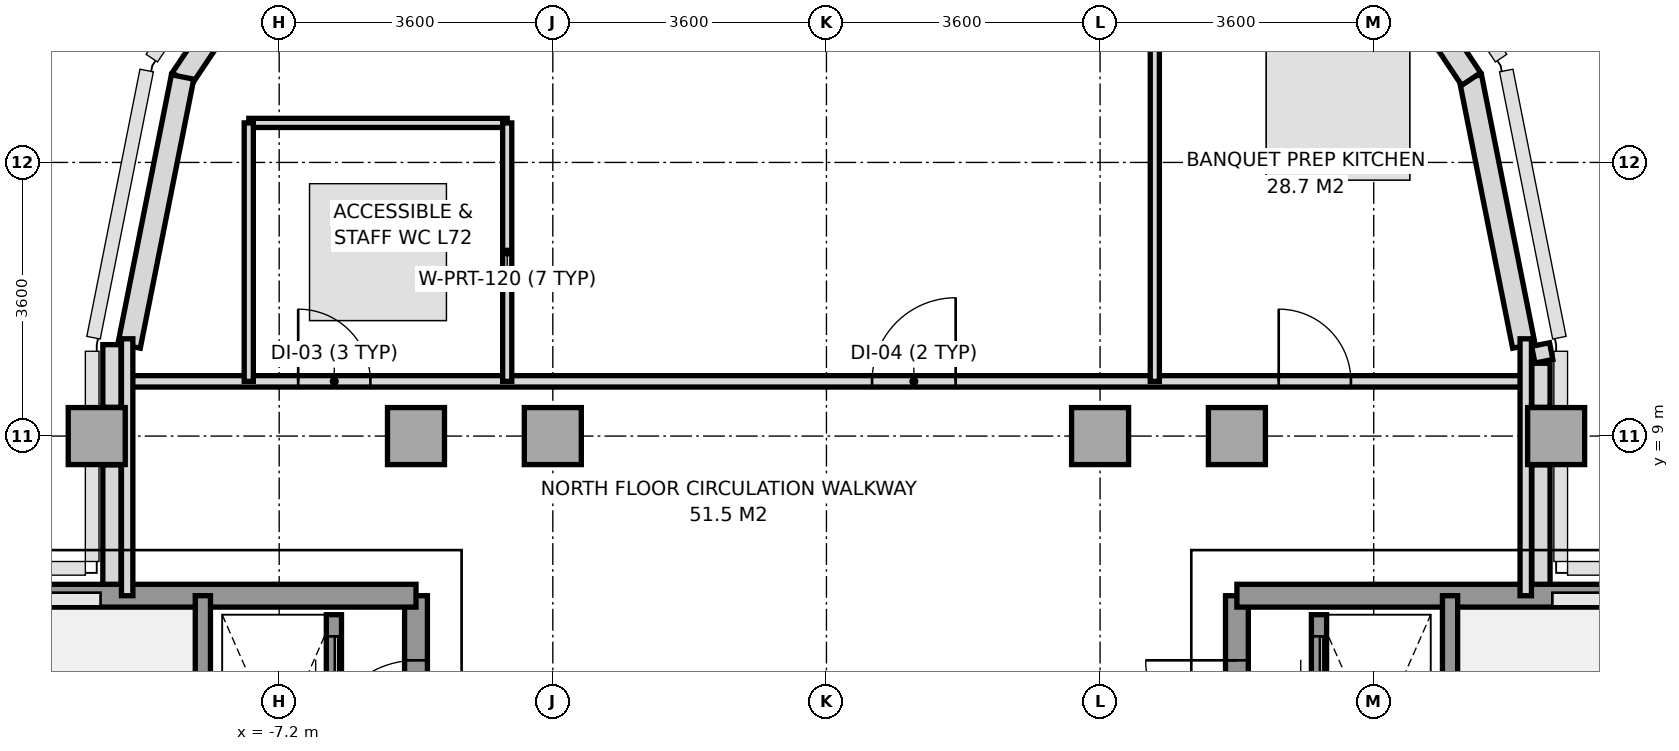
"""IFC4 building model, lengths in metres.
Left out: names, types, materials, properties, quantities, classifications, styles, units other than length and angle.
Written with IfcOpenShell. Run it as: python <this file> out.ifc"""

import sys

from ifc_helpers import new_model, si_unit, direction, frame, frame_2d, origin, origin_2d, place, context, subcontext, project, spatial, rectangle, extrude, source, transform, mapped, element, fill, save


model = new_model("IFC4")
c1 = context("Model", 3, precision=1e-05, world=origin(), true_north=direction((0.0, 1.0)))
c2 = subcontext(c1, "Body", "Model", "MODEL_VIEW")
j1 = project(units=[si_unit("LENGTHUNIT", "METRE"), si_unit("PLANEANGLEUNIT", "RADIAN")], contexts=[c1])
p1 = place(None, origin())
s1 = spatial("IfcSite", under=j1, at=p1, CompositionType="ELEMENT")
p2 = place(p1, origin())
s2 = spatial("IfcBuilding", under=s1, at=p2, CompositionType="ELEMENT")
p3 = place(p2, frame((0.0, 0.0, 258.8)))
s3 = spatial("IfcBuildingStorey", under=s2, at=p3, CompositionType="ELEMENT", Elevation=258.8)
m1 = source(origin(), c2, "Body", "SweptSolid", [
    extrude(rectangle(XDim=0.75, YDim=0.75, at=origin_2d()), origin(), (0.0, 0.0, 1.0), 3.01),
])
for number, where, z_axis, x_axis in (
    (1, (-9.6, 9.0, 0.0), (0.0, 0.0, 1.0), (1.0, 0.0, 0.0)),
    (2, (-5.4, 9.0, 0.0), (0.0, 0.0, 1.0), (1.0, 0.0, 0.0)),
    (3, (-3.6, 9.0, 0.0), (0.0, 0.0, 1.0), (1.0, 0.0, 0.0)),
    (4, (3.6, 9.0, 0.0), (0.0, 0.0, 1.0), (1.0, 0.0, 0.0)),
    (5, (5.4, 9.0, 0.0), (0.0, 0.0, 1.0), (1.0, 0.0, 0.0)),
    (6, (9.6, 9.0, 0.0), (0.0, 0.0, 1.0), (1.0, 0.0, 0.0)),
):
    element("IfcColumn", number, at=place(p3, frame(where, z_axis=z_axis, x_axis=x_axis)), inside=s3, PredefinedType="COLUMN", context=c2, shape_type="MappedRepresentation", body=[
        mapped(m1, transform((0.0, 0.0, 0.0), x_axis=(1.0, 0.0, 0.0), y_axis=(0.0, 1.0, 0.0), z_axis=(0.0, 0.0, 1.0), scale=1.0)),
    ])
p4 = place(p3, frame((9.175, 10.185, 0.0), z_axis=(0.0, 0.0, 1.0), x_axis=(-0.195114232679, 0.980780523974, 0.0)))
e7 = element("IfcWall", 7, at=p4, inside=s3, PredefinedType="SOLIDWALL", context=c2, shape_type="SweptSolid", body=[
    extrude(rectangle(XDim=3.609, YDim=0.3, at=frame_2d((1.804, 0.0))), origin(), (0.0, 0.0, 1.0), 3.01),
])
for number, where, z_axis, x_axis in (
    (8, (8.482, 13.698, 0.0), (0.0, 0.0, 1.0), (-0.556, 0.831, 0.0)),
    (9, (-7.305, 15.458, 0.0), (0.0, 0.0, 1.0), (-0.556, -0.831, 0.0)),
):
    element("IfcWall", number, at=place(p3, frame(where, z_axis=z_axis, x_axis=x_axis)), inside=s3, PredefinedType="SOLIDWALL", context=c2, shape_type="SweptSolid", body=[
        extrude(rectangle(XDim=2.118, YDim=0.3, at=frame_2d((1.059, 0.0))), origin(), (0.0, 0.0, 1.0), 2.61),
    ])
p5 = place(p3, frame((-8.471, 13.725, 0.0), z_axis=(0.0, 0.0, 1.0), x_axis=(-0.195114232679, -0.980780523974, 0.0)))
e10 = element("IfcWall", 10, at=p5, inside=s3, PredefinedType="SOLIDWALL", context=c2, shape_type="SweptSolid", body=[
    extrude(rectangle(XDim=3.609, YDim=0.3, at=frame_2d((1.804, 0.0))), origin(), (0.0, 0.0, 1.0), 3.01),
])
p6 = place(p3, frame((-9.4, 6.953, 0.0), z_axis=(0.0, 0.0, 1.0), x_axis=(0.0, 1.0, 0.0)))
e11 = element("IfcWall", 11, at=p6, inside=s3, PredefinedType="PARAPET", context=c2, shape_type="SweptSolid", body=[
    extrude(rectangle(XDim=1.669, YDim=0.24, at=frame_2d((0.834, 0.0))), origin(), (0.0, 0.0, 1.0), 1.15),
])
p7 = place(p3, frame((-9.4, 9.378, 0.0), z_axis=(0.0, 0.0, 1.0), x_axis=(0.0, 1.0, 0.0)))
e12 = element("IfcWall", 12, at=p7, inside=s3, PredefinedType="PARAPET", context=c2, shape_type="SweptSolid", body=[
    extrude(rectangle(XDim=0.825, YDim=0.24, at=frame_2d((0.413, 0.0))), origin(), (0.0, 0.0, 1.0), 1.15),
])
p8 = place(p3, frame((9.395, 10.204, 0.0), z_axis=(0.0, 0.0, 1.0), x_axis=(0.194859894132, -0.980831087221, 0.0)))
e13 = element("IfcWall", 13, at=p8, inside=s3, PredefinedType="PARAPET", context=c2, shape_type="SweptSolid", body=[
    extrude(rectangle(XDim=0.224, YDim=0.24, at=frame_2d((0.112, 0.0))), origin(), (0.0, 0.0, 1.0), 1.15),
])
p9 = place(p3, frame((9.4, 9.958, 0.0), z_axis=(0.0, 0.0, 1.0), x_axis=(0.0, -1.0, 0.0)))
e14 = element("IfcWall", 14, at=p9, inside=s3, PredefinedType="PARAPET", context=c2, shape_type="SweptSolid", body=[
    extrude(rectangle(XDim=0.58, YDim=0.24, at=frame_2d((0.29, 0.0))), origin(), (0.0, 0.0, 1.0), 1.15),
])
p10 = place(p3, frame((9.4, 8.622, 0.0), z_axis=(0.0, 0.0, 1.0), x_axis=(0.0, -1.0, 0.0)))
e15 = element("IfcWall", 15, at=p10, inside=s3, PredefinedType="PARAPET", context=c2, shape_type="SweptSolid", body=[
    extrude(rectangle(XDim=1.669, YDim=0.24, at=frame_2d((0.834, 0.0))), origin(), (0.0, 0.0, 1.0), 1.15),
])
p11 = place(p3, frame((-5.4, -5.6, 0.0), z_axis=(0.0, 0.0, 1.0), x_axis=(0.0, 1.0, 0.0)))
e16 = element("IfcWall", 16, at=p11, inside=s3, PredefinedType="SHEAR", context=c2, shape_type="SweptSolid", body=[
    extrude(rectangle(XDim=12.5, YDim=0.3, at=frame_2d((6.25, 0.0))), origin(), (0.0, 0.0, 1.0), 3.01),
])
p12 = place(p11, frame((4.55, 0.0, 0.0)))
e17 = element("IfcOpeningElement", 17, at=p12, cuts=e16, PredefinedType="OPENING", context=c2, shape_type="SweptSolid", body=[
    extrude(rectangle(XDim=1.2, YDim=2.2, at=frame_2d((0.6, 1.1))), frame((0.0, 0.16, 0.0), z_axis=(0.0, -1.0, 0.0), x_axis=(1.0, 0.0, 0.0)), (0.0, 0.0, 1.0), 0.32),
])
p13 = place(p11, frame((10.45, 0.0, 0.0)))
e18 = element("IfcOpeningElement", 18, at=p13, cuts=e16, PredefinedType="OPENING", context=c2, shape_type="SweptSolid", body=[
    extrude(rectangle(XDim=1.2, YDim=2.2, at=frame_2d((0.6, 1.1))), frame((0.0, 0.16, 0.0), z_axis=(0.0, -1.0, 0.0), x_axis=(1.0, 0.0, 0.0)), (0.0, 0.0, 1.0), 0.32),
])
p14 = place(p11, frame((6.86, 0.0, 0.0)))
e19 = element("IfcOpeningElement", 19, at=p14, cuts=e16, PredefinedType="OPENING", context=c2, shape_type="SweptSolid", body=[
    extrude(rectangle(XDim=0.8, YDim=2.1, at=frame_2d((0.4, 1.05))), frame((0.0, 0.16, 0.0), z_axis=(0.0, -1.0, 0.0), x_axis=(1.0, 0.0, 0.0)), (0.0, 0.0, 1.0), 0.32),
])
p15 = place(p3, frame((-12.35, 6.9, 0.0), z_axis=(0.0, 0.0, 1.0), x_axis=(1.0, 0.0, 0.0)))
e20 = element("IfcWall", 20, at=p15, inside=s3, PredefinedType="SHEAR", context=c2, shape_type="SweptSolid", body=[
    extrude(rectangle(XDim=6.95, YDim=0.3, at=frame_2d((3.475, 0.0))), origin(), (0.0, 0.0, 1.0), 3.01),
])
p16 = place(p3, frame((-8.204, -0.016, 0.0), z_axis=(0.0, 0.0, 1.0), x_axis=(0.0, 1.0, 0.0)))
e21 = element("IfcWall", 21, at=p16, inside=s3, PredefinedType="SOLIDWALL", context=c2, shape_type="SweptSolid", body=[
    extrude(rectangle(XDim=6.916, YDim=0.2, at=frame_2d((3.458, 0.0))), origin(), (0.0, 0.0, 1.0), 3.01),
])
p17 = place(p16, frame((0.2, 0.0, 0.0)))
e22 = element("IfcOpeningElement", 22, at=p17, cuts=e21, PredefinedType="OPENING", context=c2, shape_type="SweptSolid", body=[
    extrude(rectangle(XDim=1.2, YDim=2.2, at=frame_2d((0.6, 1.1))), frame((0.0, 0.11, 0.0), z_axis=(0.0, -1.0, 0.0), x_axis=(1.0, 0.0, 0.0)), (0.0, 0.0, 1.0), 0.22),
])
p18 = place(p3, frame((5.4, -5.6, 0.0), z_axis=(0.0, 0.0, 1.0), x_axis=(0.0, 1.0, 0.0)))
e23 = element("IfcWall", 23, at=p18, inside=s3, PredefinedType="SHEAR", context=c2, shape_type="SweptSolid", body=[
    extrude(rectangle(XDim=12.5, YDim=0.3, at=frame_2d((6.25, 0.0))), origin(), (0.0, 0.0, 1.0), 3.01),
])
p19 = place(p18, frame((4.55, 0.0, 0.0)))
e24 = element("IfcOpeningElement", 24, at=p19, cuts=e23, PredefinedType="OPENING", context=c2, shape_type="SweptSolid", body=[
    extrude(rectangle(XDim=1.2, YDim=2.2, at=frame_2d((0.6, 1.1))), frame((0.0, 0.16, 0.0), z_axis=(0.0, -1.0, 0.0), x_axis=(1.0, 0.0, 0.0)), (0.0, 0.0, 1.0), 0.32),
])
p20 = place(p18, frame((10.45, 0.0, 0.0)))
e25 = element("IfcOpeningElement", 25, at=p20, cuts=e23, PredefinedType="OPENING", context=c2, shape_type="SweptSolid", body=[
    extrude(rectangle(XDim=1.2, YDim=2.2, at=frame_2d((0.6, 1.1))), frame((0.0, 0.16, 0.0), z_axis=(0.0, -1.0, 0.0), x_axis=(1.0, 0.0, 0.0)), (0.0, 0.0, 1.0), 0.32),
])
p21 = place(p18, frame((6.86, 0.0, 0.0)))
e26 = element("IfcOpeningElement", 26, at=p21, cuts=e23, PredefinedType="OPENING", context=c2, shape_type="SweptSolid", body=[
    extrude(rectangle(XDim=0.8, YDim=2.1, at=frame_2d((0.4, 1.05))), frame((0.0, 0.16, 0.0), z_axis=(0.0, -1.0, 0.0), x_axis=(1.0, 0.0, 0.0)), (0.0, 0.0, 1.0), 0.32),
])
p22 = place(p18, frame((7.88, 0.0, 0.0)))
e27 = element("IfcOpeningElement", 27, at=p22, cuts=e23, PredefinedType="OPENING", context=c2, shape_type="SweptSolid", body=[
    extrude(rectangle(XDim=0.8, YDim=2.1, at=frame_2d((0.4, 1.05))), frame((0.0, 0.16, 0.0), z_axis=(0.0, -1.0, 0.0), x_axis=(1.0, 0.0, 0.0)), (0.0, 0.0, 1.0), 0.32),
])
p23 = place(p3, frame((5.4, 6.9, 0.0), z_axis=(0.0, 0.0, 1.0), x_axis=(1.0, 0.0, 0.0)))
e28 = element("IfcWall", 28, at=p23, inside=s3, PredefinedType="SHEAR", context=c2, shape_type="SweptSolid", body=[
    extrude(rectangle(XDim=6.95, YDim=0.3, at=frame_2d((3.475, 0.0))), origin(), (0.0, 0.0, 1.0), 3.01),
])
p24 = place(p3, frame((8.204, -0.016, 0.0), z_axis=(0.0, 0.0, 1.0), x_axis=(0.0, 1.0, 0.0)))
e29 = element("IfcWall", 29, at=p24, inside=s3, PredefinedType="SOLIDWALL", context=c2, shape_type="SweptSolid", body=[
    extrude(rectangle(XDim=6.916, YDim=0.2, at=frame_2d((3.458, 0.0))), origin(), (0.0, 0.0, 1.0), 3.01),
])
p25 = place(p24, frame((0.2, 0.0, 0.0)))
e30 = element("IfcOpeningElement", 30, at=p25, cuts=e29, PredefinedType="OPENING", context=c2, shape_type="SweptSolid", body=[
    extrude(rectangle(XDim=1.2, YDim=2.2, at=frame_2d((0.6, 1.1))), frame((0.0, 0.11, 0.0), z_axis=(0.0, -1.0, 0.0), x_axis=(1.0, 0.0, 0.0)), (0.0, 0.0, 1.0), 0.22),
])
p26 = place(p3, frame((-6.48, 4.98, 0.0), z_axis=(0.0, 0.0, 1.0), x_axis=(0.0, 1.0, 0.0)))
e31 = element("IfcWall", 31, at=p26, inside=s3, PredefinedType="SOLIDWALL", context=c2, shape_type="SweptSolid", body=[
    extrude(rectangle(XDim=1.67, YDim=0.2, at=frame_2d((0.835, 0.0))), origin(), (0.0, 0.0, 1.0), 3.01),
])
p27 = place(p26, frame((0.285, 0.0, 0.0)))
e32 = element("IfcOpeningElement", 32, at=p27, cuts=e31, PredefinedType="OPENING", context=c2, shape_type="SweptSolid", body=[
    extrude(rectangle(XDim=1.1, YDim=2.2, at=frame_2d((0.55, 1.1))), frame((0.0, 0.11, 0.0), z_axis=(0.0, -1.0, 0.0), x_axis=(1.0, 0.0, 0.0)), (0.0, 0.0, 1.0), 0.22),
])
p28 = place(p3, frame((6.48, 4.98, 0.0), z_axis=(0.0, 0.0, 1.0), x_axis=(0.0, 1.0, 0.0)))
e33 = element("IfcWall", 33, at=p28, inside=s3, PredefinedType="SOLIDWALL", context=c2, shape_type="SweptSolid", body=[
    extrude(rectangle(XDim=1.67, YDim=0.2, at=frame_2d((0.835, 0.0))), origin(), (0.0, 0.0, 1.0), 3.01),
])
p29 = place(p28, frame((0.285, 0.0, 0.0)))
e34 = element("IfcOpeningElement", 34, at=p29, cuts=e33, PredefinedType="OPENING", context=c2, shape_type="SweptSolid", body=[
    extrude(rectangle(XDim=1.1, YDim=2.2, at=frame_2d((0.55, 1.1))), frame((0.0, 0.11, 0.0), z_axis=(0.0, -1.0, 0.0), x_axis=(1.0, 0.0, 0.0)), (0.0, 0.0, 1.0), 0.22),
])
p30 = place(p3, frame((-9.2, 9.72, 0.0), z_axis=(0.0, 0.0, 1.0), x_axis=(1.0, 0.0, 0.0)))
e35 = element("IfcWall", 35, at=p30, inside=s3, PredefinedType="PARTITIONING", context=c2, shape_type="SweptSolid", body=[
    extrude(rectangle(XDim=18.4, YDim=0.15, at=frame_2d((9.2, 0.0))), origin(), (0.0, 0.0, 1.0), 3.01),
])
p31 = place(p30, frame((2.25, 0.0, 0.0)))
e36 = element("IfcOpeningElement", 36, at=p31, cuts=e35, PredefinedType="OPENING", context=c2, shape_type="SweptSolid", body=[
    extrude(rectangle(XDim=0.95, YDim=2.15, at=frame_2d((0.475, 1.075))), frame((0.0, 0.085, 0.0), z_axis=(0.0, -1.0, 0.0), x_axis=(1.0, 0.0, 0.0)), (0.0, 0.0, 1.0), 0.17),
])
p32 = place(p30, frame((9.8, 0.0, 0.0)))
e37 = element("IfcOpeningElement", 37, at=p32, cuts=e35, PredefinedType="OPENING", context=c2, shape_type="SweptSolid", body=[
    extrude(rectangle(XDim=1.1, YDim=2.2, at=frame_2d((0.55, 1.1))), frame((0.0, 0.085, 0.0), z_axis=(0.0, -1.0, 0.0), x_axis=(1.0, 0.0, 0.0)), (0.0, 0.0, 1.0), 0.17),
])
p33 = place(p30, frame((15.15, 0.0, 0.0)))
e38 = element("IfcOpeningElement", 38, at=p33, cuts=e35, PredefinedType="OPENING", context=c2, shape_type="SweptSolid", body=[
    extrude(rectangle(XDim=0.95, YDim=2.15, at=frame_2d((0.475, 1.075))), frame((0.0, 0.085, 0.0), z_axis=(0.0, -1.0, 0.0), x_axis=(1.0, 0.0, 0.0)), (0.0, 0.0, 1.0), 0.17),
])
for number, where, z_axis, x_axis in (
    (39, (-9.2, 6.9, 0.0), (0.0, 0.0, 1.0), (0.0, 1.0, 0.0)),
    (40, (9.2, 6.9, 0.0), (0.0, 0.0, 1.0), (0.0, 1.0, 0.0)),
):
    element("IfcWall", number, at=place(p3, frame(where, z_axis=z_axis, x_axis=x_axis)), inside=s3, PredefinedType="PARTITIONING", context=c2, shape_type="SweptSolid", body=[
        extrude(rectangle(XDim=3.38, YDim=0.15, at=frame_2d((1.69, 0.0))), origin(), (0.0, 0.0, 1.0), 2.61),
    ])
p34 = place(p3, frame((4.32, 9.72, 0.0), z_axis=(0.0, 0.0, 1.0), x_axis=(0.0, 1.0, 0.0)))
e41 = element("IfcWall", 41, at=p34, inside=s3, PredefinedType="PARTITIONING", context=c2, shape_type="SweptSolid", body=[
    extrude(rectangle(XDim=9.53, YDim=0.12, at=frame_2d((4.765, 0.0))), origin(), (0.0, 0.0, 1.0), 2.61),
])
for number, where, z_axis, x_axis in (
    (42, (-7.6, 13.12, 0.0), (0.0, 0.0, 1.0), (1.0, 0.0, 0.0)),
    (43, (-7.6, 9.72, 0.0), (0.0, 0.0, 1.0), (0.0, 1.0, 0.0)),
    (44, (-4.2, 9.72, 0.0), (0.0, 0.0, 1.0), (0.0, 1.0, 0.0)),
):
    element("IfcWall", number, at=place(p3, frame(where, z_axis=z_axis, x_axis=x_axis)), inside=s3, PredefinedType="PARTITIONING", context=c2, shape_type="SweptSolid", body=[
        extrude(rectangle(XDim=3.4, YDim=0.12, at=frame_2d((1.7, 0.0))), origin(), (0.0, 0.0, 1.0), 3.01),
    ])
m2 = source(origin(), c2, "Body", "SweptSolid", [
    extrude(rectangle(XDim=1.2, YDim=2.2, at=frame_2d((0.6, 1.1))), frame((0.0, 0.025, 0.0), z_axis=(0.0, -1.0, 0.0), x_axis=(1.0, 0.0, 0.0)), (0.0, 0.0, 1.0), 0.05),
])
p35 = place(p13, origin())
e45 = element("IfcDoor", 45, at=p35, inside=s3, OperationType="SINGLE_SWING_LEFT", PredefinedType="DOOR", context=c2, shape_type="MappedRepresentation", body=[
    mapped(m2, transform((0.0, 0.0, 0.0), x_axis=(1.0, 0.0, 0.0), y_axis=(0.0, 1.0, 0.0), z_axis=(0.0, 0.0, 1.0), scale=1.0)),
])
fill(e18, e45)
p36 = place(p20, origin())
e46 = element("IfcDoor", 46, at=p36, inside=s3, OperationType="SINGLE_SWING_RIGHT", PredefinedType="DOOR", context=c2, shape_type="MappedRepresentation", body=[
    mapped(m2, transform((0.0, 0.0, 0.0), x_axis=(1.0, 0.0, 0.0), y_axis=(0.0, 1.0, 0.0), z_axis=(0.0, 0.0, 1.0), scale=1.0)),
])
fill(e25, e46)
m3 = source(origin(), c2, "Body", "SweptSolid", [
    extrude(rectangle(XDim=1.1, YDim=2.2, at=frame_2d((0.55, 1.1))), frame((0.0, 0.025, 0.0), z_axis=(0.0, -1.0, 0.0), x_axis=(1.0, 0.0, 0.0)), (0.0, 0.0, 1.0), 0.05),
])
p37 = place(p27, origin())
e47 = element("IfcDoor", 47, at=p37, inside=s3, OperationType="SLIDING_TO_LEFT", PredefinedType="DOOR", context=c2, shape_type="MappedRepresentation", body=[
    mapped(m3, transform((0.0, 0.0, 0.0), x_axis=(1.0, 0.0, 0.0), y_axis=(0.0, 1.0, 0.0), z_axis=(0.0, 0.0, 1.0), scale=1.0)),
])
fill(e32, e47)
p38 = place(p29, origin())
e48 = element("IfcDoor", 48, at=p38, inside=s3, OperationType="SLIDING_TO_LEFT", PredefinedType="DOOR", context=c2, shape_type="MappedRepresentation", body=[
    mapped(m3, transform((0.0, 0.0, 0.0), x_axis=(1.0, 0.0, 0.0), y_axis=(0.0, 1.0, 0.0), z_axis=(0.0, 0.0, 1.0), scale=1.0)),
])
fill(e34, e48)
m4 = source(origin(), c2, "Body", "SweptSolid", [
    extrude(rectangle(XDim=0.95, YDim=2.15, at=frame_2d((0.475, 1.075))), frame((0.0, 0.025, 0.0), z_axis=(0.0, -1.0, 0.0), x_axis=(1.0, 0.0, 0.0)), (0.0, 0.0, 1.0), 0.05),
])
p39 = place(p31, origin())
e49 = element("IfcDoor", 49, at=p39, inside=s3, OperationType="SINGLE_SWING_LEFT", PredefinedType="DOOR", context=c2, shape_type="MappedRepresentation", body=[
    mapped(m4, transform((0.0, 0.0, 0.0), x_axis=(1.0, 0.0, 0.0), y_axis=(0.0, 1.0, 0.0), z_axis=(0.0, 0.0, 1.0), scale=1.0)),
])
fill(e36, e49)
p40 = place(p32, origin())
e50 = element("IfcDoor", 50, at=p40, inside=s3, OperationType="SINGLE_SWING_RIGHT", PredefinedType="DOOR", context=c2, shape_type="MappedRepresentation", body=[
    mapped(m3, transform((0.0, 0.0, 0.0), x_axis=(1.0, 0.0, 0.0), y_axis=(0.0, 1.0, 0.0), z_axis=(0.0, 0.0, 1.0), scale=1.0)),
])
fill(e37, e50)
p41 = place(p33, origin())
e51 = element("IfcDoor", 51, at=p41, inside=s3, OperationType="SINGLE_SWING_LEFT", PredefinedType="DOOR", context=c2, shape_type="MappedRepresentation", body=[
    mapped(m4, transform((0.0, 0.0, 0.0), x_axis=(1.0, 0.0, 0.0), y_axis=(0.0, 1.0, 0.0), z_axis=(0.0, 0.0, 1.0), scale=1.0)),
])
fill(e38, e51)
save(model, sys.argv[1])
